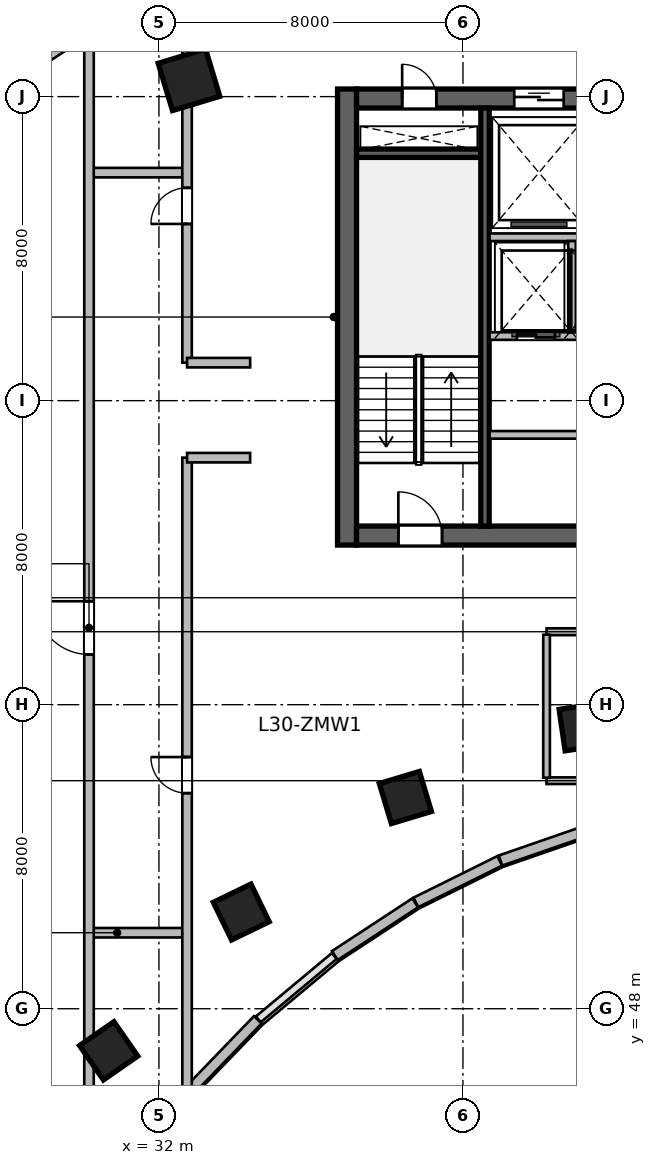
"""IFC4 building model, lengths in metres.
Left out: names, types, materials, properties, quantities, classifications, styles, units other than length and angle.
Written with IfcOpenShell. Run it as: python <this file> out.ifc"""

import sys

from ifc_helpers import new_model, si_unit, direction, frame, frame_2d, origin, origin_2d, place, context, subcontext, project, spatial, rectangle, extrude, source, transform, mapped, element, fill, save


model = new_model("IFC4")
c1 = context("Model", 3, precision=1e-05, world=origin(), true_north=direction((0.0, 1.0)))
c2 = subcontext(c1, "Body", "Model", "MODEL_VIEW")
j1 = project(units=[si_unit("LENGTHUNIT", "METRE"), si_unit("PLANEANGLEUNIT", "RADIAN")], contexts=[c1])
p1 = place(None, origin())
s1 = spatial("IfcSite", under=j1, at=p1, CompositionType="ELEMENT")
p2 = place(p1, origin())
s2 = spatial("IfcBuilding", under=s1, at=p2, CompositionType="ELEMENT")
p3 = place(p2, frame((0.0, 0.0, 127.2)))
s3 = spatial("IfcBuildingStorey", under=s2, at=p3, CompositionType="ELEMENT", Elevation=127.2)
m1 = source(origin(), c2, "Body", "SweptSolid", [
    extrude(rectangle(XDim=12.0, YDim=0.5, at=frame_2d((6.0, 0.0))), origin(), (0.0, 0.0, 1.0), 3.9),
])
p4 = place(p3, frame((36.95, 60.2, 0.0), z_axis=(0.0, 0.0, 1.0), x_axis=(0.0, 1.0, 0.0)))
e1 = element("IfcWall", 1, at=p4, inside=s3, PredefinedType="SHEAR", context=c2, shape_type="MappedRepresentation", body=[
    mapped(m1, transform((0.0, 0.0, 0.0), scale=1.0)),
])
m2 = source(origin(), c2, "Body", "SweptSolid", [
    extrude(rectangle(XDim=21.6, YDim=0.5, at=frame_2d((10.8, 0.0))), origin(), (0.0, 0.0, 1.0), 3.9),
])
p5 = place(p3, frame((37.2, 60.45, 0.0), z_axis=(0.0, 0.0, 1.0), x_axis=(1.0, 0.0, 0.0)))
e2 = element("IfcWall", 2, at=p5, inside=s3, PredefinedType="SHEAR", context=c2, shape_type="MappedRepresentation", body=[
    mapped(m2, transform((0.0, 0.0, 0.0), scale=1.0)),
])
p6 = place(p5, frame((1.1, 0.0, 0.0)))
e3 = element("IfcOpeningElement", 3, at=p6, cuts=e2, PredefinedType="OPENING", context=c2, shape_type="SweptSolid", body=[
    extrude(rectangle(XDim=1.15, YDim=2.15, at=frame_2d((0.575, 1.075))), frame((0.0, 0.26, 0.0), z_axis=(0.0, -1.0, 0.0), x_axis=(1.0, 0.0, 0.0)), (0.0, 0.0, 1.0), 0.52),
])
p7 = place(p5, frame((19.5, 0.0, 0.0)))
e4 = element("IfcOpeningElement", 4, at=p7, cuts=e2, PredefinedType="OPENING", context=c2, shape_type="SweptSolid", body=[
    extrude(rectangle(XDim=0.9, YDim=2.1, at=frame_2d((0.45, 1.05))), frame((0.0, 0.26, 0.0), z_axis=(0.0, -1.0, 0.0), x_axis=(1.0, 0.0, 0.0)), (0.0, 0.0, 1.0), 0.52),
])
p8 = place(p5, frame((12.02, 0.0, 0.0)))
e5 = element("IfcOpeningElement", 5, at=p8, cuts=e2, PredefinedType="OPENING", context=c2, shape_type="SweptSolid", body=[
    extrude(rectangle(XDim=1.6, YDim=2.15, at=frame_2d((0.8, 1.075))), frame((0.0, 0.26, 0.0), z_axis=(0.0, -1.0, 0.0), x_axis=(1.0, 0.0, 0.0)), (0.0, 0.0, 1.0), 0.52),
])
p9 = place(p3, frame((37.2, 71.95, 0.0), z_axis=(0.0, 0.0, 1.0), x_axis=(1.0, 0.0, 0.0)))
e6 = element("IfcWall", 6, at=p9, inside=s3, PredefinedType="SHEAR", context=c2, shape_type="MappedRepresentation", body=[
    mapped(m2, transform((0.0, 0.0, 0.0), scale=1.0)),
])
p10 = place(p9, frame((1.2, 0.0, 0.0)))
e7 = element("IfcOpeningElement", 7, at=p10, cuts=e6, PredefinedType="OPENING", context=c2, shape_type="SweptSolid", body=[
    extrude(rectangle(XDim=0.9, YDim=2.1, at=frame_2d((0.45, 1.05))), frame((0.0, 0.26, 0.0), z_axis=(0.0, -1.0, 0.0), x_axis=(1.0, 0.0, 0.0)), (0.0, 0.0, 1.0), 0.52),
])
p11 = place(p9, frame((14.7, 0.0, 0.0)))
e8 = element("IfcOpeningElement", 8, at=p11, cuts=e6, PredefinedType="OPENING", context=c2, shape_type="SweptSolid", body=[
    extrude(rectangle(XDim=1.2, YDim=2.15, at=frame_2d((0.6, 1.075))), frame((0.0, 0.26, 0.0), z_axis=(0.0, -1.0, 0.0), x_axis=(1.0, 0.0, 0.0)), (0.0, 0.0, 1.0), 0.52),
])
p12 = place(p9, frame((4.15, 0.0, 0.0)))
e9 = element("IfcOpeningElement", 9, at=p12, cuts=e6, PredefinedType="OPENING", context=c2, shape_type="SweptSolid", body=[
    extrude(rectangle(XDim=1.3, YDim=2.15, at=frame_2d((0.65, 1.075))), frame((0.0, 0.26, 0.0), z_axis=(0.0, -1.0, 0.0), x_axis=(1.0, 0.0, 0.0)), (0.0, 0.0, 1.0), 0.52),
])
p13 = place(p9, frame((7.1, 0.0, 0.0)))
e10 = element("IfcOpeningElement", 10, at=p13, cuts=e6, PredefinedType="OPENING", context=c2, shape_type="SweptSolid", body=[
    extrude(rectangle(XDim=0.9, YDim=2.1, at=frame_2d((0.45, 1.05))), frame((0.0, 0.26, 0.0), z_axis=(0.0, -1.0, 0.0), x_axis=(1.0, 0.0, 0.0)), (0.0, 0.0, 1.0), 0.52),
])
m3 = source(origin(), c2, "Body", "SweptSolid", [
    extrude(rectangle(XDim=3.27, YDim=0.22, at=frame_2d((1.635, 0.0))), origin(), (0.0, 0.0, 1.0), 3.9),
])
p14 = place(p3, frame((37.2, 70.51, 0.0), z_axis=(0.0, 0.0, 1.0), x_axis=(1.0, 0.0, 0.0)))
e11 = element("IfcWall", 11, at=p14, inside=s3, PredefinedType="SHEAR", context=c2, shape_type="MappedRepresentation", body=[
    mapped(m3, transform((0.0, 0.0, 0.0), scale=1.0)),
])
m4 = source(origin(), c2, "Body", "SweptSolid", [
    extrude(rectangle(XDim=11.0, YDim=0.22, at=frame_2d((5.5, 0.0))), origin(), (0.0, 0.0, 1.0), 3.9),
])
p15 = place(p3, frame((40.58, 60.7, 0.0), z_axis=(0.0, 0.0, 1.0), x_axis=(0.0, 1.0, 0.0)))
e12 = element("IfcWall", 12, at=p15, inside=s3, PredefinedType="SHEAR", context=c2, shape_type="MappedRepresentation", body=[
    mapped(m4, transform((0.0, 0.0, 0.0), scale=1.0)),
])
m5 = source(origin(), c2, "Body", "SweptSolid", [
    extrude(rectangle(XDim=1.1, YDim=1.1, at=origin_2d()), origin(), (0.0, 0.0, 1.0), 3.9),
])
for number, where, z_axis, x_axis in (
    (13, (30.677, 46.892, 0.0), (0.0, 0.0, 1.0), (-0.571, 0.821, 0.0)),
    (14, (34.166, 50.545, 0.0), (0.0, 0.0, 1.0), (-0.436, 0.9, 0.0)),
    (15, (38.485, 53.558, 0.0), (0.0, 0.0, 1.0), (-0.289, 0.957, 0.0)),
):
    element("IfcColumn", number, at=place(p3, frame(where, z_axis=z_axis, x_axis=x_axis)), inside=s3, PredefinedType="COLUMN", context=c2, shape_type="MappedRepresentation", body=[
        mapped(m5, transform((0.0, 0.0, 0.0), scale=1.0)),
    ])
m6 = source(origin(), c2, "Body", "SweptSolid", [
    extrude(rectangle(XDim=1.3, YDim=1.3, at=origin_2d()), origin(), (0.0, 0.0, 1.0), 3.9),
])
p16 = place(p3, frame((32.791, 72.442, 0.0), z_axis=(0.0, 0.0, 1.0), x_axis=(-0.288697611798, 0.957420330337, 0.0)))
e16 = element("IfcColumn", 16, at=p16, inside=s3, PredefinedType="COLUMN", context=c2, shape_type="MappedRepresentation", body=[
    mapped(m6, transform((0.0, 0.0, 0.0), scale=1.0)),
])
p17 = place(p3, frame((43.154, 55.411, 0.0), z_axis=(0.0, 0.0, 1.0), x_axis=(-0.143492621991, 0.98965138682, 0.0)))
e17 = element("IfcColumn", 17, at=p17, inside=s3, PredefinedType="COLUMN", context=c2, shape_type="MappedRepresentation", body=[
    mapped(m5, transform((0.0, 0.0, 0.0), scale=1.0)),
])
m7 = source(origin(), c2, "Body", "SweptSolid", [
    extrude(rectangle(XDim=2.411, YDim=0.28, at=frame_2d((1.205, 0.0))), origin(), (0.0, 0.0, 1.0), 3.65),
])
p18 = place(p3, frame((43.266, 52.689, 0.0), z_axis=(0.0, 0.0, 1.0), x_axis=(-0.944880068161, -0.327416640982, 0.0)))
e18 = element("IfcWall", 18, at=p18, inside=s3, PredefinedType="SOLIDWALL", context=c2, shape_type="MappedRepresentation", body=[
    mapped(m7, transform((0.0, 0.0, 0.0), scale=1.0)),
])
m8 = source(origin(), c2, "Body", "SweptSolid", [
    extrude(rectangle(XDim=2.462, YDim=0.28, at=frame_2d((1.231, 0.0))), origin(), (0.0, 0.0, 1.0), 3.65),
])
p19 = place(p3, frame((40.967, 51.891, 0.0), z_axis=(0.0, 0.0, 1.0), x_axis=(-0.8959882207, -0.444077817917, 0.0)))
e19 = element("IfcWall", 19, at=p19, inside=s3, PredefinedType="SOLIDWALL", context=c2, shape_type="MappedRepresentation", body=[
    mapped(m8, transform((0.0, 0.0, 0.0), scale=1.0)),
])
m9 = source(origin(), c2, "Body", "SweptSolid", [
    extrude(rectangle(XDim=2.527, YDim=0.28, at=frame_2d((1.264, 0.0))), origin(), (0.0, 0.0, 1.0), 3.65),
])
p20 = place(p3, frame((38.742, 50.786, 0.0), z_axis=(0.0, 0.0, 1.0), x_axis=(-0.836011905051, -0.548711303523, 0.0)))
e20 = element("IfcWall", 20, at=p20, inside=s3, PredefinedType="SOLIDWALL", context=c2, shape_type="MappedRepresentation", body=[
    mapped(m9, transform((0.0, 0.0, 0.0), scale=1.0)),
])
m10 = source(origin(), c2, "Body", "SweptSolid", [
    extrude(rectangle(XDim=2.68, YDim=0.28, at=frame_2d((1.34, 0.0))), origin(), (0.0, 0.0, 1.0), 3.65),
])
p21 = place(p3, frame((34.601, 47.708, 0.0), z_axis=(0.0, 0.0, 1.0), x_axis=(-0.694561996568, -0.719432855049, 0.0)))
e21 = element("IfcWall", 21, at=p21, inside=s3, PredefinedType="SOLIDWALL", context=c2, shape_type="MappedRepresentation", body=[
    mapped(m10, transform((0.0, 0.0, 0.0), scale=1.0)),
])
m11 = source(origin(), c2, "Body", "SweptSolid", [
    extrude(rectangle(XDim=4.626, YDim=0.28, at=frame_2d((2.313, 0.0))), origin(), (0.0, 0.0, 1.0), 3.65),
])
p22 = place(p3, frame((27.382, 71.958, 0.0), z_axis=(0.0, 0.0, 1.0), x_axis=(0.83595938331, 0.548791316855, 0.0)))
e22 = element("IfcWall", 22, at=p22, inside=s3, PredefinedType="SOLIDWALL", context=c2, shape_type="MappedRepresentation", body=[
    mapped(m11, transform((0.0, 0.0, 0.0), scale=1.0)),
])
m12 = source(origin(), c2, "Body", "SweptSolid", [
    extrude(rectangle(XDim=8.8, YDim=0.2, at=frame_2d((4.4, 0.0))), origin(), (0.0, 0.0, 1.0), 3.65),
])
p23 = place(p3, frame((40.7, 68.3, 0.0), z_axis=(0.0, 0.0, 1.0), x_axis=(1.0, 0.0, 0.0)))
e23 = element("IfcWall", 23, at=p23, inside=s3, PredefinedType="SOLIDWALL", context=c2, shape_type="MappedRepresentation", body=[
    mapped(m12, transform((0.0, 0.0, 0.0), scale=1.0)),
])
m13 = source(origin(), c2, "Body", "SweptSolid", [
    extrude(rectangle(XDim=8.02, YDim=0.2, at=frame_2d((4.01, 0.0))), origin(), (0.0, 0.0, 1.0), 3.65),
])
p24 = place(p3, frame((40.7, 63.1, 0.0), z_axis=(0.0, 0.0, 1.0), x_axis=(1.0, 0.0, 0.0)))
e24 = element("IfcWall", 24, at=p24, inside=s3, PredefinedType="SOLIDWALL", context=c2, shape_type="MappedRepresentation", body=[
    mapped(m13, transform((0.0, 0.0, 0.0), scale=1.0)),
])
p25 = place(p24, frame((3.4, 0.0, 0.0)))
e25 = element("IfcOpeningElement", 25, at=p25, cuts=e24, PredefinedType="OPENING", context=c2, shape_type="SweptSolid", body=[
    extrude(rectangle(XDim=0.95, YDim=2.15, at=frame_2d((0.475, 1.075))), frame((0.0, 0.11, 0.0), z_axis=(0.0, -1.0, 0.0), x_axis=(1.0, 0.0, 0.0)), (0.0, 0.0, 1.0), 0.22),
])
p26 = place(p3, frame((40.7, 65.7, 0.0), z_axis=(0.0, 0.0, 1.0), x_axis=(1.0, 0.0, 0.0)))
e26 = element("IfcWall", 26, at=p26, inside=s3, PredefinedType="SOLIDWALL", context=c2, shape_type="MappedRepresentation", body=[
    mapped(m12, transform((0.0, 0.0, 0.0), scale=1.0)),
])
p27 = place(p26, frame((0.72, 0.0, 0.0)))
e27 = element("IfcOpeningElement", 27, at=p27, cuts=e26, PredefinedType="OPENING", context=c2, shape_type="SweptSolid", body=[
    extrude(rectangle(XDim=1.0, YDim=2.15, at=frame_2d((0.5, 1.075))), frame((0.0, 0.11, 0.0), z_axis=(0.0, -1.0, 0.0), x_axis=(1.0, 0.0, 0.0)), (0.0, 0.0, 1.0), 0.22),
])
p28 = place(p26, frame((2.62, 0.0, 0.0)))
e28 = element("IfcOpeningElement", 28, at=p28, cuts=e26, PredefinedType="OPENING", context=c2, shape_type="SweptSolid", body=[
    extrude(rectangle(XDim=1.0, YDim=2.15, at=frame_2d((0.5, 1.075))), frame((0.0, 0.11, 0.0), z_axis=(0.0, -1.0, 0.0), x_axis=(1.0, 0.0, 0.0)), (0.0, 0.0, 1.0), 0.22),
])
p29 = place(p26, frame((4.55, 0.0, 0.0)))
e29 = element("IfcOpeningElement", 29, at=p29, cuts=e26, PredefinedType="OPENING", context=c2, shape_type="SweptSolid", body=[
    extrude(rectangle(XDim=1.0, YDim=2.15, at=frame_2d((0.5, 1.075))), frame((0.0, 0.11, 0.0), z_axis=(0.0, -1.0, 0.0), x_axis=(1.0, 0.0, 0.0)), (0.0, 0.0, 1.0), 0.22),
])
p30 = place(p26, frame((6.55, 0.0, 0.0)))
e30 = element("IfcOpeningElement", 30, at=p30, cuts=e26, PredefinedType="OPENING", context=c2, shape_type="SweptSolid", body=[
    extrude(rectangle(XDim=1.0, YDim=2.15, at=frame_2d((0.5, 1.075))), frame((0.0, 0.11, 0.0), z_axis=(0.0, -1.0, 0.0), x_axis=(1.0, 0.0, 0.0)), (0.0, 0.0, 1.0), 0.22),
])
m14 = source(origin(), c2, "Body", "SweptSolid", [
    extrude(rectangle(XDim=2.4, YDim=0.2, at=frame_2d((1.2, 0.0))), origin(), (0.0, 0.0, 1.0), 3.65),
])
p31 = place(p3, frame((42.87, 65.8, 0.0), z_axis=(0.0, 0.0, 1.0), x_axis=(0.0, 1.0, 0.0)))
e31 = element("IfcWall", 31, at=p31, inside=s3, PredefinedType="SOLIDWALL", context=c2, shape_type="MappedRepresentation", body=[
    mapped(m14, transform((0.0, 0.0, 0.0), scale=1.0)),
])
m15 = source(origin(), c2, "Body", "SweptSolid", [
    extrude(rectangle(XDim=4.176, YDim=0.175, at=frame_2d((2.088, 0.0))), origin(), (0.0, 0.0, 1.0), 3.65),
])
p32 = place(p3, frame((42.2, 54.0, 0.0), z_axis=(0.0, 0.0, 1.0), x_axis=(1.0, 0.0, 0.0)))
e32 = element("IfcWall", 32, at=p32, inside=s3, PredefinedType="PARTITIONING", context=c2, shape_type="MappedRepresentation", body=[
    mapped(m15, transform((0.0, 0.0, 0.0), scale=1.0)),
])
m16 = source(origin(), c2, "Body", "SweptSolid", [
    extrude(rectangle(XDim=4.176, YDim=0.18, at=frame_2d((2.088, 0.0))), origin(), (0.0, 0.0, 1.0), 3.65),
])
p33 = place(p3, frame((42.2, 57.92, 0.0), z_axis=(0.0, 0.0, 1.0), x_axis=(1.0, 0.0, 0.0)))
e33 = element("IfcWall", 33, at=p33, inside=s3, PredefinedType="PLUMBINGWALL", context=c2, shape_type="MappedRepresentation", body=[
    mapped(m16, transform((0.0, 0.0, 0.0), scale=1.0)),
])
p34 = place(p33, frame((1.638, 0.0, 0.0)))
e34 = element("IfcOpeningElement", 34, at=p34, cuts=e33, PredefinedType="OPENING", context=c2, shape_type="SweptSolid", body=[
    extrude(rectangle(XDim=0.9, YDim=2.08, at=frame_2d((0.45, 1.04))), frame((0.0, 0.1, 0.0), z_axis=(0.0, -1.0, 0.0), x_axis=(1.0, 0.0, 0.0)), (0.0, 0.0, 1.0), 0.2),
])
m17 = source(origin(), c2, "Body", "SweptSolid", [
    extrude(rectangle(XDim=3.763, YDim=0.175, at=frame_2d((1.881, 0.0))), origin(), (0.0, 0.0, 1.0), 3.65),
])
p35 = place(p3, frame((42.2, 54.079, 0.0), z_axis=(0.0, 0.0, 1.0), x_axis=(0.0, 1.0, 0.0)))
e35 = element("IfcWall", 35, at=p35, inside=s3, PredefinedType="PARTITIONING", context=c2, shape_type="MappedRepresentation", body=[
    mapped(m17, transform((0.0, 0.0, 0.0), scale=1.0)),
])
m18 = source(origin(), c2, "Body", "SweptSolid", [
    extrude(rectangle(XDim=2.5, YDim=0.25, at=frame_2d((1.25, 0.0))), origin(), (0.0, 0.0, 1.0), 3.65),
])
for number, where, z_axis, x_axis in (
    (36, (30.2, 50.0, 0.0), (0.0, 0.0, 1.0), (1.0, 0.0, 0.0)),
    (37, (30.2, 70.0, 0.0), (0.0, 0.0, 1.0), (1.0, 0.0, 0.0)),
):
    element("IfcWall", number, at=place(p3, frame(where, z_axis=z_axis, x_axis=x_axis)), inside=s3, PredefinedType="PARTITIONING", context=c2, shape_type="MappedRepresentation", body=[
        mapped(m18, transform((0.0, 0.0, 0.0), scale=1.0)),
    ])
m19 = source(origin(), c2, "Body", "SweptSolid", [
    extrude(rectangle(XDim=31.495, YDim=0.25, at=frame_2d((15.748, 0.0))), origin(), (0.0, 0.0, 1.0), 2.942),
])
p36 = place(p3, frame((30.16, 42.274, 0.0), z_axis=(0.0, 0.0, 1.0), x_axis=(0.0, 1.0, 0.0)))
e38 = element("IfcWall", 38, at=p36, inside=s3, PredefinedType="PARTITIONING", context=c2, shape_type="MappedRepresentation", body=[
    mapped(m19, transform((0.0, 0.0, 0.0), scale=1.0)),
])
p37 = place(p36, frame((15.048, 0.0, 0.0)))
e39 = element("IfcOpeningElement", 39, at=p37, cuts=e38, PredefinedType="OPENING", context=c2, shape_type="SweptSolid", body=[
    extrude(rectangle(XDim=1.4, YDim=2.15, at=frame_2d((0.7, 1.075))), frame((0.0, 0.135, 0.0), z_axis=(0.0, -1.0, 0.0), x_axis=(1.0, 0.0, 0.0)), (0.0, 0.0, 1.0), 0.27),
])
m20 = source(origin(), c2, "Body", "SweptSolid", [
    extrude(rectangle(XDim=16.706, YDim=0.25, at=frame_2d((8.353, 0.0))), origin(), (0.0, 0.0, 1.0), 2.942),
])
p38 = place(p3, frame((32.74, 45.794, 0.0), z_axis=(0.0, 0.0, 1.0), x_axis=(0.0, 1.0, 0.0)))
e40 = element("IfcWall", 40, at=p38, inside=s3, PredefinedType="PARTITIONING", context=c2, shape_type="MappedRepresentation", body=[
    mapped(m20, transform((0.0, 0.0, 0.0), scale=1.0)),
])
p39 = place(p38, frame((7.878, 0.0, 0.0)))
e41 = element("IfcOpeningElement", 41, at=p39, cuts=e40, PredefinedType="OPENING", context=c2, shape_type="SweptSolid", body=[
    extrude(rectangle(XDim=0.95, YDim=2.1, at=frame_2d((0.475, 1.05))), frame((0.0, 0.135, 0.0), z_axis=(0.0, -1.0, 0.0), x_axis=(1.0, 0.0, 0.0)), (0.0, 0.0, 1.0), 0.27),
])
m21 = source(origin(), c2, "Body", "SweptSolid", [
    extrude(rectangle(XDim=1.66, YDim=0.25, at=frame_2d((0.83, 0.0))), origin(), (0.0, 0.0, 1.0), 3.65),
])
p40 = place(p3, frame((32.74, 62.5, 0.0), z_axis=(0.0, 0.0, 1.0), x_axis=(1.0, 0.0, 0.0)))
e42 = element("IfcWall", 42, at=p40, inside=s3, PredefinedType="PARTITIONING", context=c2, shape_type="MappedRepresentation", body=[
    mapped(m21, transform((0.0, 0.0, 0.0), scale=1.0)),
])
m22 = source(origin(), c2, "Body", "SweptSolid", [
    extrude(rectangle(XDim=10.224, YDim=0.25, at=frame_2d((5.112, 0.0))), origin(), (0.0, 0.0, 1.0), 3.65),
])
p41 = place(p3, frame((32.74, 65.0, 0.0), z_axis=(0.0, 0.0, 1.0), x_axis=(0.0, 1.0, 0.0)))
e43 = element("IfcWall", 43, at=p41, inside=s3, PredefinedType="PARTITIONING", context=c2, shape_type="MappedRepresentation", body=[
    mapped(m22, transform((0.0, 0.0, 0.0), scale=1.0)),
])
p42 = place(p41, frame((3.65, 0.0, 0.0)))
e44 = element("IfcOpeningElement", 44, at=p42, cuts=e43, PredefinedType="OPENING", context=c2, shape_type="SweptSolid", body=[
    extrude(rectangle(XDim=0.95, YDim=2.1, at=frame_2d((0.475, 1.05))), frame((0.0, 0.135, 0.0), z_axis=(0.0, -1.0, 0.0), x_axis=(1.0, 0.0, 0.0)), (0.0, 0.0, 1.0), 0.27),
])
p43 = place(p3, frame((32.74, 65.0, 0.0), z_axis=(0.0, 0.0, 1.0), x_axis=(1.0, 0.0, 0.0)))
e45 = element("IfcWall", 45, at=p43, inside=s3, PredefinedType="PARTITIONING", context=c2, shape_type="MappedRepresentation", body=[
    mapped(m21, transform((0.0, 0.0, 0.0), scale=1.0)),
])
m23 = source(origin(), c2, "Body", "SweptSolid", [
    extrude(rectangle(XDim=1.15, YDim=2.15, at=frame_2d((0.575, 1.075))), frame((0.0, 0.025, 0.0), z_axis=(0.0, -1.0, 0.0), x_axis=(1.0, 0.0, 0.0)), (0.0, 0.0, 1.0), 0.05),
])
p44 = place(p6, origin())
e46 = element("IfcDoor", 46, at=p44, inside=s3, OperationType="SINGLE_SWING_LEFT", PredefinedType="DOOR", context=c2, shape_type="MappedRepresentation", body=[
    mapped(m23, transform((0.0, 0.0, 0.0), scale=1.0)),
])
fill(e3, e46)
m24 = source(origin(), c2, "Body", "SweptSolid", [
    extrude(rectangle(XDim=0.9, YDim=2.1, at=frame_2d((0.45, 1.05))), frame((0.0, 0.025, 0.0), z_axis=(0.0, -1.0, 0.0), x_axis=(1.0, 0.0, 0.0)), (0.0, 0.0, 1.0), 0.05),
])
p45 = place(p10, origin())
e47 = element("IfcDoor", 47, at=p45, inside=s3, OperationType="SINGLE_SWING_LEFT", PredefinedType="DOOR", context=c2, shape_type="MappedRepresentation", body=[
    mapped(m24, transform((0.0, 0.0, 0.0), scale=1.0)),
])
fill(e7, e47)
m25 = source(origin(), c2, "Body", "SweptSolid", [
    extrude(rectangle(XDim=1.3, YDim=2.15, at=frame_2d((0.65, 1.075))), frame((0.0, 0.025, 0.0), z_axis=(0.0, -1.0, 0.0), x_axis=(1.0, 0.0, 0.0)), (0.0, 0.0, 1.0), 0.05),
])
p46 = place(p12, origin())
e48 = element("IfcDoor", 48, at=p46, inside=s3, OperationType="DOUBLE_DOOR_SLIDING", PredefinedType="DOOR", context=c2, shape_type="MappedRepresentation", body=[
    mapped(m25, transform((0.0, 0.0, 0.0), scale=1.0)),
])
fill(e9, e48)
m26 = source(origin(), c2, "Body", "SweptSolid", [
    extrude(rectangle(XDim=1.0, YDim=2.15, at=frame_2d((0.5, 1.075))), frame((0.0, 0.025, 0.0), z_axis=(0.0, -1.0, 0.0), x_axis=(1.0, 0.0, 0.0)), (0.0, 0.0, 1.0), 0.05),
])
p47 = place(p27, origin())
e49 = element("IfcDoor", 49, at=p47, inside=s3, OperationType="DOUBLE_DOOR_SLIDING", PredefinedType="DOOR", context=c2, shape_type="MappedRepresentation", body=[
    mapped(m26, transform((0.0, 0.0, 0.0), scale=1.0)),
])
fill(e27, e49)
m27 = source(origin(), c2, "Body", "SweptSolid", [
    extrude(rectangle(XDim=1.4, YDim=2.15, at=frame_2d((0.7, 1.075))), frame((0.0, 0.025, 0.0), z_axis=(0.0, -1.0, 0.0), x_axis=(1.0, 0.0, 0.0)), (0.0, 0.0, 1.0), 0.05),
])
p48 = place(p37, origin())
e50 = element("IfcDoor", 50, at=p48, inside=s3, OperationType="SINGLE_SWING_RIGHT", PredefinedType="DOOR", context=c2, shape_type="MappedRepresentation", body=[
    mapped(m27, transform((0.0, 0.0, 0.0), scale=1.0)),
])
fill(e39, e50)
m28 = source(origin(), c2, "Body", "SweptSolid", [
    extrude(rectangle(XDim=0.95, YDim=2.1, at=frame_2d((0.475, 1.05))), frame((0.0, 0.025, 0.0), z_axis=(0.0, -1.0, 0.0), x_axis=(1.0, 0.0, 0.0)), (0.0, 0.0, 1.0), 0.05),
])
p49 = place(p39, origin())
e51 = element("IfcDoor", 51, at=p49, inside=s3, OperationType="SINGLE_SWING_RIGHT", PredefinedType="DOOR", context=c2, shape_type="MappedRepresentation", body=[
    mapped(m28, transform((0.0, 0.0, 0.0), scale=1.0)),
])
fill(e41, e51)
p50 = place(p42, origin())
e52 = element("IfcDoor", 52, at=p50, inside=s3, OperationType="SINGLE_SWING_LEFT", PredefinedType="DOOR", context=c2, shape_type="MappedRepresentation", body=[
    mapped(m28, transform((0.0, 0.0, 0.0), scale=1.0)),
])
fill(e44, e52)
save(model, sys.argv[1])
